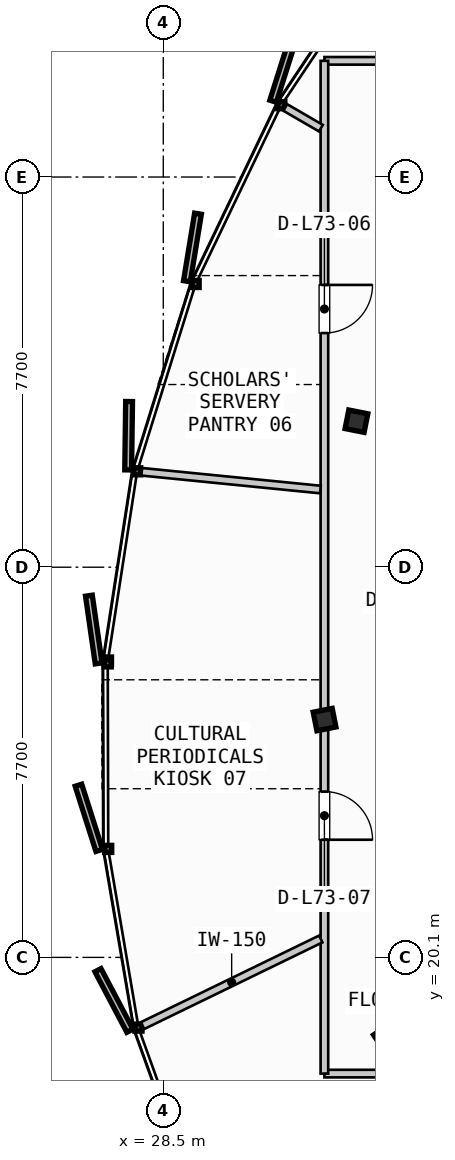
"""IFC4 building model, lengths in metres.
Left out: names, types, materials, properties, quantities, classifications, styles, units other than length and angle.
Written with IfcOpenShell. Run it as: python <this file> out.ifc"""

import sys

from ifc_helpers import new_model, si_unit, direction, frame, frame_2d, origin, origin_2d, place, context, subcontext, project, spatial, rectangle, i_section, extrude, source, transform, mapped, element, fill, save


model = new_model("IFC4")
c1 = context("Model", 3, precision=1e-05, world=origin(), true_north=direction((0.0, 1.0)))
c2 = subcontext(c1, "Body", "Model", "MODEL_VIEW")
j1 = project(units=[si_unit("LENGTHUNIT", "METRE"), si_unit("PLANEANGLEUNIT", "RADIAN")], contexts=[c1])
p1 = place(None, origin())
s1 = spatial("IfcSite", under=j1, at=p1, CompositionType="ELEMENT")
p2 = place(p1, origin())
s2 = spatial("IfcBuilding", under=s1, at=p2, CompositionType="ELEMENT")
p3 = place(p2, frame((0.0, 0.0, 276.7)))
s3 = spatial("IfcBuildingStorey", under=s2, at=p3, CompositionType="ELEMENT", Elevation=276.7)
m1 = source(origin(), c2, "Body", "SweptSolid", [
    extrude(i_section(OverallWidth=0.374, OverallDepth=0.383, WebThickness=0.017, FlangeThickness=0.026, FilletRadius=0.015, at=origin_2d()), origin(), (0.0, 0.0, 1.0), 3.21),
])
for number, where, z_axis, x_axis in (
    (1, (32.312, 30.682, 0.0), (0.0, 0.0, 1.0), (-0.981, 0.195, 0.0)),
    (2, (31.683, 24.793, 0.0), (0.0, 0.0, 1.0), (-0.981, -0.195, 0.0)),
    (3, (32.913, 18.521, 0.0), (0.0, 0.0, 1.0), (-0.831, -0.556, 0.0)),
):
    element("IfcColumn", number, at=place(p3, frame(where, z_axis=z_axis, x_axis=x_axis)), inside=s3, PredefinedType="COLUMN", context=c2, shape_type="MappedRepresentation", body=[
        mapped(m1, transform((0.0, 0.0, 0.0), scale=1.0)),
    ])
p4 = place(p3, frame((31.68, 17.807, 0.0), z_axis=(0.0, 0.0, 1.0), x_axis=(1.0, 0.0, 0.0)))
e4 = element("IfcWall", 4, at=p4, inside=s3, PredefinedType="PARTITIONING", context=c2, shape_type="SweptSolid", body=[
    extrude(rectangle(XDim=28.87, YDim=0.15, at=frame_2d((14.435, 0.0))), origin(), (0.0, 0.0, 1.0), 2.455),
])
p5 = place(p4, frame((13.025, 0.0, 0.0)))
e5 = element("IfcOpeningElement", 5, at=p5, cuts=e4, PredefinedType="OPENING", context=c2, shape_type="SweptSolid", body=[
    extrude(rectangle(XDim=0.95, YDim=2.15, at=frame_2d((0.475, 1.075))), frame((0.0, 0.085, 0.0), z_axis=(0.0, -1.0, 0.0), x_axis=(1.0, 0.0, 0.0)), (0.0, 0.0, 1.0), 0.17),
])
p6 = place(p3, frame((60.55, 37.793, 0.0), z_axis=(0.0, 0.0, 1.0), x_axis=(-1.0, 0.0, 0.0)))
e6 = element("IfcWall", 6, at=p6, inside=s3, PredefinedType="PARTITIONING", context=c2, shape_type="SweptSolid", body=[
    extrude(rectangle(XDim=28.87, YDim=0.15, at=frame_2d((14.435, 0.0))), origin(), (0.0, 0.0, 1.0), 2.455),
])
p7 = place(p6, frame((5.419, 0.0, 0.0)))
e7 = element("IfcOpeningElement", 7, at=p7, cuts=e6, PredefinedType="OPENING", context=c2, shape_type="SweptSolid", body=[
    extrude(rectangle(XDim=0.95, YDim=2.15, at=frame_2d((0.475, 1.075))), frame((0.0, 0.085, 0.0), z_axis=(0.0, -1.0, 0.0), x_axis=(1.0, 0.0, 0.0)), (0.0, 0.0, 1.0), 0.17),
])
p8 = place(p6, frame((19.27, 0.0, 0.0)))
e8 = element("IfcOpeningElement", 8, at=p8, cuts=e6, PredefinedType="OPENING", context=c2, shape_type="SweptSolid", body=[
    extrude(rectangle(XDim=0.95, YDim=2.15, at=frame_2d((0.475, 1.075))), frame((0.0, 0.085, 0.0), z_axis=(0.0, -1.0, 0.0), x_axis=(1.0, 0.0, 0.0)), (0.0, 0.0, 1.0), 0.17),
])
p9 = place(p3, frame((31.68, 37.793, 0.0), z_axis=(0.0, 0.0, 1.0), x_axis=(0.0, -1.0, 0.0)))
e9 = element("IfcWall", 9, at=p9, inside=s3, PredefinedType="PARTITIONING", context=c2, shape_type="SweptSolid", body=[
    extrude(rectangle(XDim=19.986, YDim=0.15, at=frame_2d((9.993, 0.0))), origin(), (0.0, 0.0, 1.0), 2.455),
])
p10 = place(p9, frame((4.422, 0.0, 0.0)))
e10 = element("IfcOpeningElement", 10, at=p10, cuts=e9, PredefinedType="OPENING", context=c2, shape_type="SweptSolid", body=[
    extrude(rectangle(XDim=0.95, YDim=2.15, at=frame_2d((0.475, 1.075))), frame((0.0, 0.085, 0.0), z_axis=(0.0, -1.0, 0.0), x_axis=(1.0, 0.0, 0.0)), (0.0, 0.0, 1.0), 0.17),
])
p11 = place(p9, frame((14.421, 0.0, 0.0)))
e11 = element("IfcOpeningElement", 11, at=p11, cuts=e9, PredefinedType="OPENING", context=c2, shape_type="SweptSolid", body=[
    extrude(rectangle(XDim=0.95, YDim=2.15, at=frame_2d((0.475, 1.075))), frame((0.0, 0.085, 0.0), z_axis=(0.0, -1.0, 0.0), x_axis=(1.0, 0.0, 0.0)), (0.0, 0.0, 1.0), 0.17),
])
p12 = place(p3, frame((31.608, 20.463, 0.0), z_axis=(0.0, 0.0, 1.0), x_axis=(-0.899391040277, -0.437145006455, 0.0)))
e12 = element("IfcWall", 12, at=p12, inside=s3, PredefinedType="PARTITIONING", context=c2, shape_type="SweptSolid", body=[
    extrude(rectangle(XDim=3.91, YDim=0.15, at=frame_2d((1.955, 0.0))), origin(), (0.0, 0.0, 1.0), 2.455),
])
p13 = place(p3, frame((31.611, 36.464, 0.0), z_axis=(0.0, 0.0, 1.0), x_axis=(-0.865028583044, 0.501722583224, 0.0)))
e13 = element("IfcWall", 13, at=p13, inside=s3, PredefinedType="PARTITIONING", context=c2, shape_type="SweptSolid", body=[
    extrude(rectangle(XDim=0.813, YDim=0.15, at=frame_2d((0.407, 0.0))), origin(), (0.0, 0.0, 1.0), 2.455),
])
p14 = place(p3, frame((31.6, 29.333, 0.0), z_axis=(0.0, 0.0, 1.0), x_axis=(-0.995099755561, 0.098876066281, 0.0)))
e14 = element("IfcWall", 14, at=p14, inside=s3, PredefinedType="PARTITIONING", context=c2, shape_type="SweptSolid", body=[
    extrude(rectangle(XDim=3.543, YDim=0.15, at=frame_2d((1.771, 0.0))), origin(), (0.0, 0.0, 1.0), 2.455),
])
m2 = source(origin(), c2, "Body", "SweptSolid", [
    extrude(rectangle(XDim=0.95, YDim=2.15, at=frame_2d((0.475, 1.075))), frame((0.0, 0.025, 0.0), z_axis=(0.0, -1.0, 0.0), x_axis=(1.0, 0.0, 0.0)), (0.0, 0.0, 1.0), 0.05),
])
p15 = place(p10, origin())
e15 = element("IfcDoor", 15, at=p15, inside=s3, OperationType="SINGLE_SWING_LEFT", PredefinedType="DOOR", context=c2, shape_type="MappedRepresentation", body=[
    mapped(m2, transform((0.0, 0.0, 0.0), scale=1.0)),
])
fill(e10, e15)
p16 = place(p11, origin())
e16 = element("IfcDoor", 16, at=p16, inside=s3, OperationType="SINGLE_SWING_RIGHT", PredefinedType="DOOR", context=c2, shape_type="MappedRepresentation", body=[
    mapped(m2, transform((0.0, 0.0, 0.0), scale=1.0)),
])
fill(e11, e16)
save(model, sys.argv[1])
